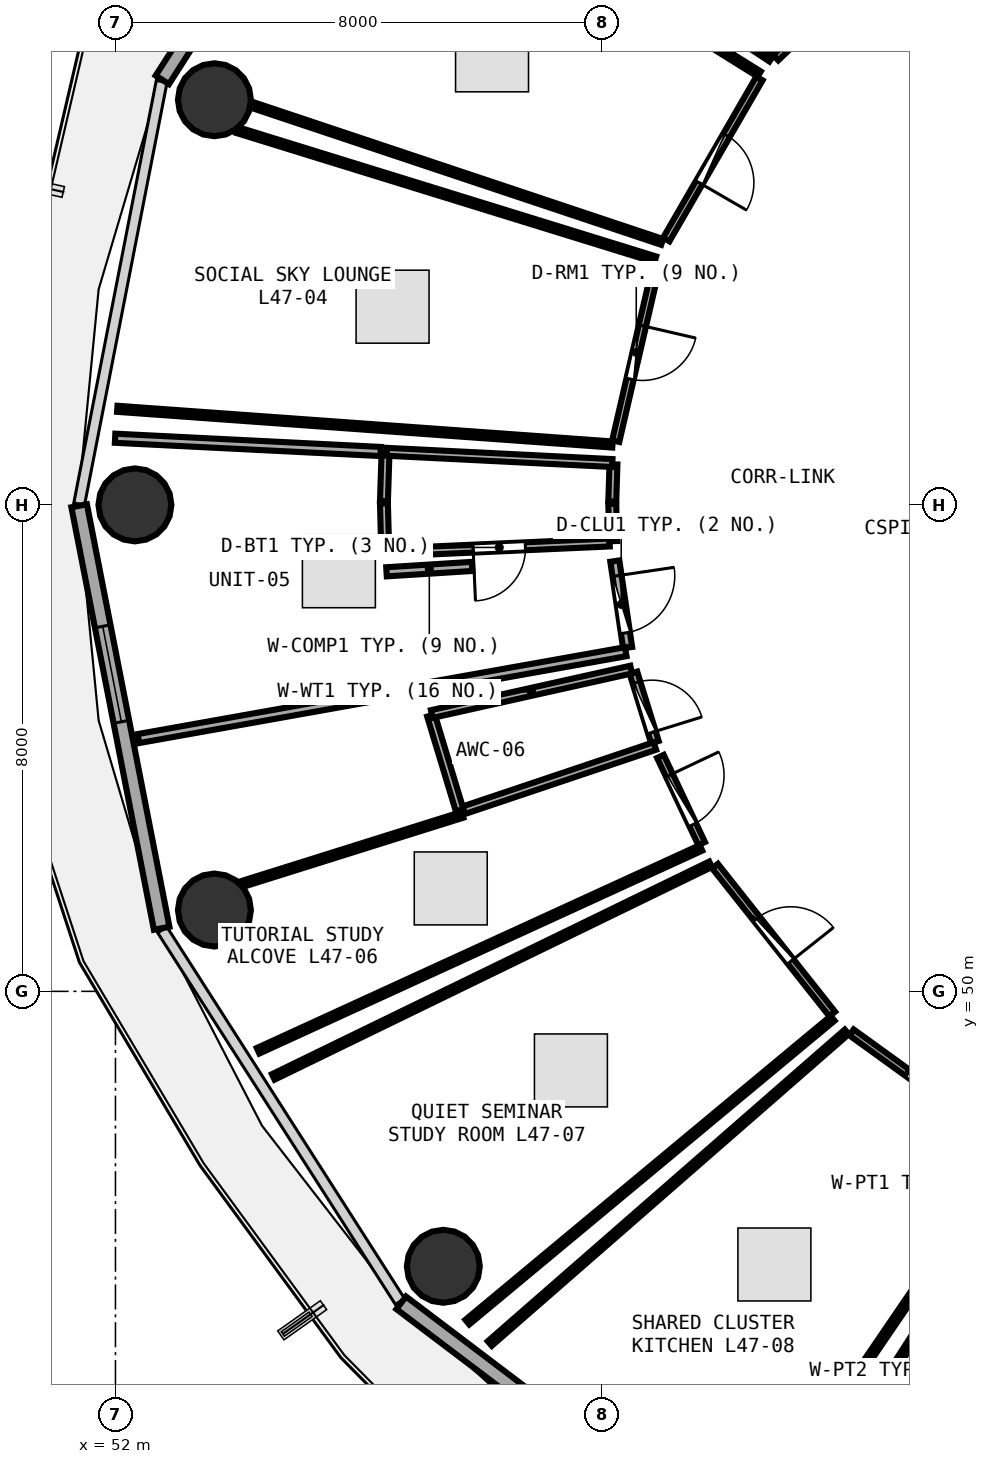
"""IFC4 building model, lengths in metres.
Left out: names, types, materials, properties, quantities, classifications, styles, units other than length and angle.
Written with IfcOpenShell. Run it as: python <this file> out.ifc"""

import sys

from ifc_helpers import new_model, si_unit, direction, frame, frame_2d, origin, origin_2d, place, context, subcontext, project, spatial, rectangle, circle, extrude, element, fill, save


model = new_model("IFC4")
c1 = context("Model", 3, precision=1e-05, world=origin(), true_north=direction((0.0, 1.0)))
c2 = subcontext(c1, "Body", "Model", "MODEL_VIEW")
j1 = project(units=[si_unit("LENGTHUNIT", "METRE"), si_unit("PLANEANGLEUNIT", "RADIAN")], contexts=[c1])
p1 = place(None, origin())
s1 = spatial("IfcSite", under=j1, at=p1, CompositionType="ELEMENT")
p2 = place(p1, origin())
s2 = spatial("IfcBuilding", under=s1, at=p2, CompositionType="ELEMENT")
p3 = place(p2, frame((0.0, 0.0, 184.35)))
s3 = spatial("IfcBuildingStorey", under=s2, at=p3, CompositionType="ELEMENT", Elevation=184.35)
for number, where, z_axis, x_axis in (
    (1, (53.627, 64.663, 0.0), (0.0, 0.0, 1.0), (1.0, 0.0, 0.0)),
    (2, (52.32, 58.0, 0.0), (0.0, 0.0, 1.0), (1.0, 0.0, 0.0)),
    (3, (53.627, 51.337, 0.0), (0.0, 0.0, 1.0), (1.0, 0.0, 0.0)),
    (4, (57.392, 45.479, 0.0), (0.0, 0.0, 1.0), (1.0, 0.0, 0.0)),
):
    element("IfcColumn", number, at=place(p3, frame(where, z_axis=z_axis, x_axis=x_axis)), inside=s3, PredefinedType="COLUMN", context=c2, shape_type="SweptSolid", body=[
        extrude(circle(Radius=0.6, at=origin_2d()), origin(), (0.0, 0.0, 1.0), 4.76),
    ])
p4 = place(p3, frame((56.679, 71.1, 0.0), z_axis=(0.0, 0.0, 1.0), x_axis=(-0.538801521808, -0.842432739213, 0.0)))
e5 = element("IfcWall", 5, at=p4, inside=s3, PredefinedType="SOLIDWALL", context=c2, shape_type="SweptSolid", body=[
    extrude(rectangle(XDim=7.253, YDim=0.26, at=frame_2d((3.627, 0.0))), origin(), (0.0, 0.0, 1.0), 4.345),
])
p5 = place(p4, frame((3.152, 0.0, 0.0)))
e6 = element("IfcOpeningElement", 6, at=p5, cuts=e5, PredefinedType="OPENING", context=c2, shape_type="SweptSolid", body=[
    extrude(rectangle(XDim=0.95, YDim=2.1, at=frame_2d((0.475, 1.05))), frame((0.0, 0.14, 0.0), z_axis=(0.0, -1.0, 0.0), x_axis=(1.0, 0.0, 0.0)), (0.0, 0.0, 1.0), 0.28),
])
p6 = place(p4, frame((4.452, 0.0, 0.85)))
e7 = element("IfcOpeningElement", 7, at=p6, cuts=e5, PredefinedType="OPENING", context=c2, shape_type="SweptSolid", body=[
    extrude(rectangle(XDim=1.2, YDim=1.45, at=frame_2d((0.6, 0.725))), frame((0.0, 0.14, 0.0), z_axis=(0.0, -1.0, 0.0), x_axis=(1.0, 0.0, 0.0)), (0.0, 0.0, 1.0), 0.28),
])
p7 = place(p3, frame((51.403, 57.985, 0.0), z_axis=(0.0, 0.0, 1.0), x_axis=(0.191716984769, -0.981450252306, 0.0)))
e8 = element("IfcWall", 8, at=p7, inside=s3, PredefinedType="SOLIDWALL", context=c2, shape_type="SweptSolid", body=[
    extrude(rectangle(XDim=7.079, YDim=0.26, at=frame_2d((3.54, 0.0))), origin(), (0.0, 0.0, 1.0), 4.345),
])
p8 = place(p7, frame((2.02, 0.0, 0.85)))
e9 = element("IfcOpeningElement", 9, at=p8, cuts=e8, PredefinedType="OPENING", context=c2, shape_type="SweptSolid", body=[
    extrude(rectangle(XDim=1.6, YDim=1.45, at=frame_2d((0.8, 0.725))), frame((0.0, 0.14, 0.0), z_axis=(0.0, -1.0, 0.0), x_axis=(1.0, 0.0, 0.0)), (0.0, 0.0, 1.0), 0.28),
])
p9 = place(p3, frame((56.699, 44.878, 0.0), z_axis=(0.0, 0.0, 1.0), x_axis=(0.797163719609, -0.603763202042, 0.0)))
e10 = element("IfcWall", 10, at=p9, inside=s3, PredefinedType="SOLIDWALL", context=c2, shape_type="SweptSolid", body=[
    extrude(rectangle(XDim=7.512, YDim=0.26, at=frame_2d((3.756, 0.0))), origin(), (0.0, 0.0, 1.0), 4.345),
])
p10 = place(p9, frame((2.956, 0.0, 0.85)))
e11 = element("IfcOpeningElement", 11, at=p10, cuts=e10, PredefinedType="OPENING", context=c2, shape_type="SweptSolid", body=[
    extrude(rectangle(XDim=1.6, YDim=1.45, at=frame_2d((0.8, 0.725))), frame((0.0, 0.14, 0.0), z_axis=(0.0, -1.0, 0.0), x_axis=(1.0, 0.0, 0.0)), (0.0, 0.0, 1.0), 0.28),
])
p11 = place(p3, frame((65.135, 67.531, 0.0), z_axis=(0.0, 0.0, 1.0), x_axis=(-0.722401093559, -0.691474265627, 0.0)))
e12 = element("IfcWall", 12, at=p11, inside=s3, PredefinedType="PARTITIONING", context=c2, shape_type="SweptSolid", body=[
    extrude(rectangle(XDim=3.15, YDim=0.12, at=frame_2d((1.575, 0.0))), origin(), (0.0, 0.0, 1.0), 2.345),
])
p12 = place(p11, frame((1.125, 0.0, 0.0)))
e13 = element("IfcOpeningElement", 13, at=p12, cuts=e12, PredefinedType="OPENING", context=c2, shape_type="SweptSolid", body=[
    extrude(rectangle(XDim=0.9, YDim=2.08, at=frame_2d((0.45, 1.04))), frame((0.0, 0.07, 0.0), z_axis=(0.0, -1.0, 0.0), x_axis=(1.0, 0.0, 0.0)), (0.0, 0.0, 1.0), 0.14),
])
p13 = place(p3, frame((62.591, 65.012, 0.0), z_axis=(0.0, 0.0, 1.0), x_axis=(-0.500746842293, -0.865593784598, 0.0)))
e14 = element("IfcWall", 14, at=p13, inside=s3, PredefinedType="PARTITIONING", context=c2, shape_type="SweptSolid", body=[
    extrude(rectangle(XDim=3.059, YDim=0.12, at=frame_2d((1.53, 0.0))), origin(), (0.0, 0.0, 1.0), 2.345),
])
p14 = place(p13, frame((1.08, 0.0, 0.0)))
e15 = element("IfcOpeningElement", 15, at=p14, cuts=e14, PredefinedType="OPENING", context=c2, shape_type="SweptSolid", body=[
    extrude(rectangle(XDim=0.9, YDim=2.08, at=frame_2d((0.45, 1.04))), frame((0.0, 0.07, 0.0), z_axis=(0.0, -1.0, 0.0), x_axis=(1.0, 0.0, 0.0)), (0.0, 0.0, 1.0), 0.14),
])
p15 = place(p3, frame((60.903, 61.968, 0.0), z_axis=(0.0, 0.0, 1.0), x_axis=(-0.225317744346, -0.974285335045, 0.0)))
e16 = element("IfcWall", 16, at=p15, inside=s3, PredefinedType="PARTITIONING", context=c2, shape_type="SweptSolid", body=[
    extrude(rectangle(XDim=2.996, YDim=0.12, at=frame_2d((1.498, 0.0))), origin(), (0.0, 0.0, 1.0), 4.35),
])
p16 = place(p15, frame((1.048, 0.0, 0.0)))
e17 = element("IfcOpeningElement", 17, at=p16, cuts=e16, PredefinedType="OPENING", context=c2, shape_type="SweptSolid", body=[
    extrude(rectangle(XDim=0.9, YDim=2.08, at=frame_2d((0.45, 1.04))), frame((0.0, 0.07, 0.0), z_axis=(0.0, -1.0, 0.0), x_axis=(1.0, 0.0, 0.0)), (0.0, 0.0, 1.0), 0.14),
])
p17 = place(p3, frame((60.127, 57.381, 0.0), z_axis=(0.0, 0.0, 1.0), x_axis=(-0.998998516644, -0.044743309488, 0.0)))
e18 = element("IfcWall", 18, at=p17, inside=s3, PredefinedType="PLUMBINGWALL", context=c2, shape_type="SweptSolid", body=[
    extrude(rectangle(XDim=3.634, YDim=0.13, at=frame_2d((1.817, 0.0))), origin(), (0.0, 0.0, 1.0), 4.045),
])
p18 = place(p17, frame((1.387, 0.0, 0.0)))
e19 = element("IfcOpeningElement", 19, at=p18, cuts=e18, PredefinedType="OPENING", context=c2, shape_type="SweptSolid", body=[
    extrude(rectangle(XDim=0.86, YDim=2.05, at=frame_2d((0.43, 1.025))), frame((0.0, 0.075, 0.0), z_axis=(0.0, -1.0, 0.0), x_axis=(1.0, 0.0, 0.0)), (0.0, 0.0, 1.0), 0.15),
])
p19 = place(p3, frame((60.213, 57.076, 0.0), z_axis=(0.0, 0.0, 1.0), x_axis=(0.146099718117, -0.98926986832, 0.0)))
e20 = element("IfcWall", 20, at=p19, inside=s3, PredefinedType="PARTITIONING", context=c2, shape_type="SweptSolid", body=[
    extrude(rectangle(XDim=1.439, YDim=0.15, at=frame_2d((0.719, 0.0))), origin(), (0.0, 0.0, 1.0), 4.35),
])
p20 = place(p19, frame((0.244, 0.0, 0.0)))
e21 = element("IfcOpeningElement", 21, at=p20, cuts=e20, PredefinedType="OPENING", context=c2, shape_type="SweptSolid", body=[
    extrude(rectangle(XDim=0.95, YDim=2.08, at=frame_2d((0.475, 1.04))), frame((0.0, 0.085, 0.0), z_axis=(0.0, -1.0, 0.0), x_axis=(1.0, 0.0, 0.0)), (0.0, 0.0, 1.0), 0.17),
])
p21 = place(p3, frame((60.519, 55.239, 0.0), z_axis=(0.0, 0.0, 1.0), x_axis=(0.296096905528, -0.955157904504, 0.0)))
e22 = element("IfcWall", 22, at=p21, inside=s3, PredefinedType="PLUMBINGWALL", context=c2, shape_type="SweptSolid", body=[
    extrude(rectangle(XDim=1.194, YDim=0.13, at=frame_2d((0.597, 0.0))), origin(), (0.0, 0.0, 1.0), 4.35),
])
p22 = place(p21, frame((0.167, 0.0, 0.0)))
e23 = element("IfcOpeningElement", 23, at=p22, cuts=e22, PredefinedType="OPENING", context=c2, shape_type="SweptSolid", body=[
    extrude(rectangle(XDim=0.86, YDim=2.05, at=frame_2d((0.43, 1.025))), frame((0.0, 0.075, 0.0), z_axis=(0.0, -1.0, 0.0), x_axis=(1.0, 0.0, 0.0)), (0.0, 0.0, 1.0), 0.15),
])
p23 = place(p3, frame((60.963, 53.864, 0.0), z_axis=(0.0, 0.0, 1.0), x_axis=(0.427397920828, -0.904063613509, 0.0)))
e24 = element("IfcWall", 24, at=p23, inside=s3, PredefinedType="PARTITIONING", context=c2, shape_type="SweptSolid", body=[
    extrude(rectangle(XDim=1.586, YDim=0.12, at=frame_2d((0.793, 0.0))), origin(), (0.0, 0.0, 1.0), 4.105),
])
p24 = place(p23, frame((0.343, 0.0, 0.0)))
e25 = element("IfcOpeningElement", 25, at=p24, cuts=e24, PredefinedType="OPENING", context=c2, shape_type="SweptSolid", body=[
    extrude(rectangle(XDim=0.9, YDim=2.08, at=frame_2d((0.45, 1.04))), frame((0.0, 0.07, 0.0), z_axis=(0.0, -1.0, 0.0), x_axis=(1.0, 0.0, 0.0)), (0.0, 0.0, 1.0), 0.14),
])
p25 = place(p3, frame((61.86, 52.06, 0.0), z_axis=(0.0, 0.0, 1.0), x_axis=(0.621061577605, -0.783761773005, 0.0)))
e26 = element("IfcWall", 26, at=p25, inside=s3, PredefinedType="PARTITIONING", context=c2, shape_type="SweptSolid", body=[
    extrude(rectangle(XDim=3.103, YDim=0.12, at=frame_2d((1.552, 0.0))), origin(), (0.0, 0.0, 1.0), 2.345),
])
p26 = place(p25, frame((1.102, 0.0, 0.0)))
e27 = element("IfcOpeningElement", 27, at=p26, cuts=e26, PredefinedType="OPENING", context=c2, shape_type="SweptSolid", body=[
    extrude(rectangle(XDim=0.9, YDim=2.08, at=frame_2d((0.45, 1.04))), frame((0.0, 0.07, 0.0), z_axis=(0.0, -1.0, 0.0), x_axis=(1.0, 0.0, 0.0)), (0.0, 0.0, 1.0), 0.14),
])
p27 = place(p3, frame((64.106, 49.325, 0.0), z_axis=(0.0, 0.0, 1.0), x_axis=(0.810538273734, -0.585685672364, 0.0)))
e28 = element("IfcWall", 28, at=p27, inside=s3, PredefinedType="PARTITIONING", context=c2, shape_type="SweptSolid", body=[
    extrude(rectangle(XDim=3.198, YDim=0.12, at=frame_2d((1.599, 0.0))), origin(), (0.0, 0.0, 1.0), 2.345),
])
p28 = place(p27, frame((1.149, 0.0, 0.0)))
e29 = element("IfcOpeningElement", 29, at=p28, cuts=e28, PredefinedType="OPENING", context=c2, shape_type="SweptSolid", body=[
    extrude(rectangle(XDim=0.9, YDim=2.08, at=frame_2d((0.45, 1.04))), frame((0.0, 0.07, 0.0), z_axis=(0.0, -1.0, 0.0), x_axis=(1.0, 0.0, 0.0)), (0.0, 0.0, 1.0), 0.14),
])
p29 = place(p3, frame((62.783, 65.334, 0.0), z_axis=(0.0, 0.0, 1.0), x_axis=(-0.835790537916, 0.549048428401, 0.0)))
e30 = element("IfcWall", 30, at=p29, inside=s3, PredefinedType="PARTITIONING", context=c2, shape_type="SweptSolid", body=[
    extrude(rectangle(XDim=7.903, YDim=0.1, at=frame_2d((3.952, 0.0))), origin(), (0.0, 0.0, 1.0), 3.895),
])
p30 = place(p3, frame((60.991, 62.325, 0.0), z_axis=(0.0, 0.0, 1.0), x_axis=(-0.948483978449, 0.316825097847, 0.0)))
e31 = element("IfcWall", 31, at=p30, inside=s3, PredefinedType="PARTITIONING", context=c2, shape_type="SweptSolid", body=[
    extrude(rectangle(XDim=7.111, YDim=0.1, at=frame_2d((3.555, 0.0))), origin(), (0.0, 0.0, 1.0), 2.345),
])
p31 = place(p3, frame((55.866, 69.277, 0.0), z_axis=(0.0, 0.0, 1.0), x_axis=(0.84851390129, -0.529173090129, 0.0)))
e32 = element("IfcWall", 32, at=p31, inside=s3, PredefinedType="PARTITIONING", context=c2, shape_type="SweptSolid", body=[
    extrude(rectangle(XDim=7.921, YDim=0.1, at=frame_2d((3.96, 0.0))), origin(), (0.0, 0.0, 1.0), 2.345),
])
p32 = place(p3, frame((60.174, 58.993, 0.0), z_axis=(0.0, 0.0, 1.0), x_axis=(-0.997411279475, 0.071907854766, 0.0)))
e33 = element("IfcWall", 33, at=p32, inside=s3, PredefinedType="PARTITIONING", context=c2, shape_type="SweptSolid", body=[
    extrude(rectangle(XDim=8.166, YDim=0.1, at=frame_2d((4.083, 0.0))), origin(), (0.0, 0.0, 1.0), 3.895),
])
p33 = place(p3, frame((54.003, 64.163, 0.0), z_axis=(0.0, 0.0, 1.0), x_axis=(0.955390108929, -0.295346812679, 0.0)))
e34 = element("IfcWall", 34, at=p33, inside=s3, PredefinedType="PARTITIONING", context=c2, shape_type="SweptSolid", body=[
    extrude(rectangle(XDim=7.196, YDim=0.1, at=frame_2d((3.598, 0.0))), origin(), (0.0, 0.0, 1.0), 2.345),
])
p34 = place(p3, frame((60.19, 58.667, 0.0), z_axis=(0.0, 0.0, 1.0), x_axis=(-0.032292682442, -0.999478455326, 0.0)))
e35 = element("IfcWall", 35, at=p34, inside=s3, PredefinedType="PLUMBINGWALL", context=c2, shape_type="SweptSolid", body=[
    extrude(rectangle(XDim=0.612, YDim=0.13, at=frame_2d((0.306, 0.0))), origin(), (0.0, 0.0, 1.0), 2.345),
])
p35 = place(p3, frame((60.17, 58.015, 0.0), z_axis=(0.0, 0.0, 1.0), x_axis=(0.026369723842, -0.99965225837, 0.0)))
e36 = element("IfcWall", 36, at=p35, inside=s3, PredefinedType="PLUMBINGWALL", context=c2, shape_type="SweptSolid", body=[
    extrude(rectangle(XDim=0.611, YDim=0.13, at=frame_2d((0.306, 0.0))), origin(), (0.0, 0.0, 1.0), 2.345),
])
p36 = place(p3, frame((56.437, 57.236, 0.0), z_axis=(0.0, 0.0, 1.0), x_axis=(-0.026607722643, 0.999645951873, 0.0)))
e37 = element("IfcWall", 37, at=p36, inside=s3, PredefinedType="PLUMBINGWALL", context=c2, shape_type="SweptSolid", body=[
    extrude(rectangle(XDim=0.789, YDim=0.13, at=frame_2d((0.395, 0.0))), origin(), (0.0, 0.0, 1.0), 2.345),
])
p37 = place(p3, frame((56.416, 58.065, 0.0), z_axis=(0.0, 0.0, 1.0), x_axis=(0.03247049286, 0.999472694521, 0.0)))
e38 = element("IfcWall", 38, at=p37, inside=s3, PredefinedType="PLUMBINGWALL", context=c2, shape_type="SweptSolid", body=[
    extrude(rectangle(XDim=0.79, YDim=0.13, at=frame_2d((0.395, 0.0))), origin(), (0.0, 0.0, 1.0), 2.345),
])
p38 = place(p3, frame((56.462, 58.873, 0.0), z_axis=(0.0, 0.0, 1.0), x_axis=(0.998757579638, -0.049832691243, 0.0)))
e39 = element("IfcWall", 39, at=p38, inside=s3, PredefinedType="PLUMBINGWALL", context=c2, shape_type="SweptSolid", body=[
    extrude(rectangle(XDim=3.714, YDim=0.13, at=frame_2d((1.857, 0.0))), origin(), (0.0, 0.0, 1.0), 4.045),
])
p39 = place(p3, frame((60.393, 55.586, 0.0), z_axis=(0.0, 0.0, 1.0), x_axis=(-0.984476835755, -0.175514557407, 0.0)))
e40 = element("IfcWall", 40, at=p39, inside=s3, PredefinedType="PARTITIONING", context=c2, shape_type="SweptSolid", body=[
    extrude(rectangle(XDim=8.142, YDim=0.15, at=frame_2d((4.071, 0.0))), origin(), (0.0, 0.0, 1.0), 3.895),
])
p40 = place(p3, frame((51.994, 59.096, 0.0), z_axis=(0.0, 0.0, 1.0), x_axis=(0.998756789481, -0.049848525207, 0.0)))
e41 = element("IfcWall", 41, at=p40, inside=s3, PredefinedType="PARTITIONING", context=c2, shape_type="SweptSolid", body=[
    extrude(rectangle(XDim=4.374, YDim=0.15, at=frame_2d((2.187, 0.0))), origin(), (0.0, 0.0, 1.0), 3.895),
])
p41 = place(p3, frame((56.458, 56.899, 0.0), z_axis=(0.0, 0.0, 1.0), x_axis=(0.998023505666, 0.062841722907, 0.0)))
e42 = element("IfcWall", 42, at=p41, inside=s3, PredefinedType="PARTITIONING", context=c2, shape_type="SweptSolid", body=[
    extrude(rectangle(XDim=1.41, YDim=0.15, at=frame_2d((0.705, 0.0))), origin(), (0.0, 0.0, 1.0), 4.35),
])
p42 = place(p3, frame((60.871, 54.035, 0.0), z_axis=(0.0, 0.0, 1.0), x_axis=(-0.947910298115, -0.318537386704, 0.0)))
e43 = element("IfcWall", 43, at=p42, inside=s3, PredefinedType="PLUMBINGWALL", context=c2, shape_type="SweptSolid", body=[
    extrude(rectangle(XDim=3.36, YDim=0.13, at=frame_2d((1.68, 0.0))), origin(), (0.0, 0.0, 1.0), 4.045),
])
p43 = place(p3, frame((57.661, 52.977, 0.0), z_axis=(0.0, 0.0, 1.0), x_axis=(-0.289861876094, 0.957068489079, 0.0)))
e44 = element("IfcWall", 44, at=p43, inside=s3, PredefinedType="PLUMBINGWALL", context=c2, shape_type="SweptSolid", body=[
    extrude(rectangle(XDim=1.63, YDim=0.13, at=frame_2d((0.815, 0.0))), origin(), (0.0, 0.0, 1.0), 4.35),
])
p44 = place(p3, frame((57.202, 54.56, 0.0), z_axis=(0.0, 0.0, 1.0), x_axis=(0.976027779337, 0.217645983107, 0.0)))
e45 = element("IfcWall", 45, at=p44, inside=s3, PredefinedType="PLUMBINGWALL", context=c2, shape_type="SweptSolid", body=[
    extrude(rectangle(XDim=3.36, YDim=0.13, at=frame_2d((1.68, 0.0))), origin(), (0.0, 0.0, 1.0), 4.045),
])
p45 = place(p3, frame((61.63, 52.359, 0.0), z_axis=(0.0, 0.0, 1.0), x_axis=(-0.909155211227, -0.416457443083, 0.0)))
e46 = element("IfcWall", 46, at=p45, inside=s3, PredefinedType="PARTITIONING", context=c2, shape_type="SweptSolid", body=[
    extrude(rectangle(XDim=8.012, YDim=0.1, at=frame_2d((4.006, 0.0))), origin(), (0.0, 0.0, 1.0), 2.345),
])
p46 = place(p3, frame((54.083, 51.765, 0.0), z_axis=(0.0, 0.0, 1.0), x_axis=(0.954047805858, 0.299654441212, 0.0)))
e47 = element("IfcWall", 47, at=p46, inside=s3, PredefinedType="PARTITIONING", context=c2, shape_type="SweptSolid", body=[
    extrude(rectangle(XDim=3.798, YDim=0.1, at=frame_2d((1.899, 0.0))), origin(), (0.0, 0.0, 1.0), 2.345),
])
p47 = place(p3, frame((63.794, 49.555, 0.0), z_axis=(0.0, 0.0, 1.0), x_axis=(-0.768927769446, -0.639335659396, 0.0)))
e48 = element("IfcWall", 48, at=p47, inside=s3, PredefinedType="PARTITIONING", context=c2, shape_type="SweptSolid", body=[
    extrude(rectangle(XDim=7.812, YDim=0.1, at=frame_2d((3.906, 0.0))), origin(), (0.0, 0.0, 1.0), 2.345),
])
p48 = place(p3, frame((54.595, 48.593, 0.0), z_axis=(0.0, 0.0, 1.0), x_axis=(0.899324003441, 0.437282902518, 0.0)))
e49 = element("IfcWall", 49, at=p48, inside=s3, PredefinedType="PARTITIONING", context=c2, shape_type="SweptSolid", body=[
    extrude(rectangle(XDim=7.997, YDim=0.1, at=frame_2d((3.999, 0.0))), origin(), (0.0, 0.0, 1.0), 2.345),
])
p49 = place(p3, frame((66.723, 47.384, 0.0), z_axis=(0.0, 0.0, 1.0), x_axis=(-0.563521193737, -0.826101606468, 0.0)))
e50 = element("IfcWall", 50, at=p49, inside=s3, PredefinedType="PARTITIONING", context=c2, shape_type="SweptSolid", body=[
    extrude(rectangle(XDim=6.944, YDim=0.1, at=frame_2d((3.472, 0.0))), origin(), (0.0, 0.0, 1.0), 2.345),
])
p50 = place(p3, frame((58.156, 44.208, 0.0), z_axis=(0.0, 0.0, 1.0), x_axis=(0.753307828271, 0.657668089438, 0.0)))
e51 = element("IfcWall", 51, at=p50, inside=s3, PredefinedType="PARTITIONING", context=c2, shape_type="SweptSolid", body=[
    extrude(rectangle(XDim=7.793, YDim=0.1, at=frame_2d((3.897, 0.0))), origin(), (0.0, 0.0, 1.0), 2.345),
])
p51 = place(p3, frame((63.44, 41.689, 0.0), z_axis=(0.0, 0.0, 1.0), x_axis=(0.542254246964, 0.840214455749, 0.0)))
e52 = element("IfcWall", 52, at=p51, inside=s3, PredefinedType="PARTITIONING", context=c2, shape_type="SweptSolid", body=[
    extrude(rectangle(XDim=6.592, YDim=0.1, at=frame_2d((3.296, 0.0))), origin(), (0.0, 0.0, 1.0), 2.345),
])
p52 = place(p8, origin())
e53 = element("IfcWindow", 53, at=p52, inside=s3, PartitioningType="SINGLE_PANEL", PredefinedType="WINDOW", context=c2, shape_type="SweptSolid", body=[
    extrude(rectangle(XDim=1.6, YDim=1.45, at=frame_2d((0.8, 0.725))), frame((0.0, 0.03, 0.0), z_axis=(0.0, -1.0, 0.0), x_axis=(1.0, 0.0, 0.0)), (0.0, 0.0, 1.0), 0.06),
])
fill(e9, e53)
p53 = place(p14, origin())
e54 = element("IfcDoor", 54, at=p53, inside=s3, OperationType="SINGLE_SWING_RIGHT", PredefinedType="DOOR", context=c2, shape_type="SweptSolid", body=[
    extrude(rectangle(XDim=0.9, YDim=2.08, at=frame_2d((0.45, 1.04))), frame((0.0, 0.025, 0.0), z_axis=(0.0, -1.0, 0.0), x_axis=(1.0, 0.0, 0.0)), (0.0, 0.0, 1.0), 0.05),
])
fill(e15, e54)
p54 = place(p16, origin())
e55 = element("IfcDoor", 55, at=p54, inside=s3, OperationType="SINGLE_SWING_LEFT", PredefinedType="DOOR", context=c2, shape_type="SweptSolid", body=[
    extrude(rectangle(XDim=0.9, YDim=2.08, at=frame_2d((0.45, 1.04))), frame((0.0, 0.025, 0.0), z_axis=(0.0, -1.0, 0.0), x_axis=(1.0, 0.0, 0.0)), (0.0, 0.0, 1.0), 0.05),
])
fill(e17, e55)
p55 = place(p18, origin())
e56 = element("IfcDoor", 56, at=p55, inside=s3, OperationType="SINGLE_SWING_RIGHT", PredefinedType="DOOR", context=c2, shape_type="SweptSolid", body=[
    extrude(rectangle(XDim=0.86, YDim=2.05, at=frame_2d((0.43, 1.025))), frame((0.0, 0.025, 0.0), z_axis=(0.0, -1.0, 0.0), x_axis=(1.0, 0.0, 0.0)), (0.0, 0.0, 1.0), 0.05),
])
fill(e19, e56)
p56 = place(p20, origin())
e57 = element("IfcDoor", 57, at=p56, inside=s3, OperationType="SINGLE_SWING_LEFT", PredefinedType="DOOR", context=c2, shape_type="SweptSolid", body=[
    extrude(rectangle(XDim=0.95, YDim=2.08, at=frame_2d((0.475, 1.04))), frame((0.0, 0.025, 0.0), z_axis=(0.0, -1.0, 0.0), x_axis=(1.0, 0.0, 0.0)), (0.0, 0.0, 1.0), 0.05),
])
fill(e21, e57)
p57 = place(p22, origin())
e58 = element("IfcDoor", 58, at=p57, inside=s3, OperationType="SINGLE_SWING_RIGHT", PredefinedType="DOOR", context=c2, shape_type="SweptSolid", body=[
    extrude(rectangle(XDim=0.86, YDim=2.05, at=frame_2d((0.43, 1.025))), frame((0.0, 0.025, 0.0), z_axis=(0.0, -1.0, 0.0), x_axis=(1.0, 0.0, 0.0)), (0.0, 0.0, 1.0), 0.05),
])
fill(e23, e58)
p58 = place(p24, origin())
e59 = element("IfcDoor", 59, at=p58, inside=s3, OperationType="SINGLE_SWING_LEFT", PredefinedType="DOOR", context=c2, shape_type="SweptSolid", body=[
    extrude(rectangle(XDim=0.9, YDim=2.08, at=frame_2d((0.45, 1.04))), frame((0.0, 0.025, 0.0), z_axis=(0.0, -1.0, 0.0), x_axis=(1.0, 0.0, 0.0)), (0.0, 0.0, 1.0), 0.05),
])
fill(e25, e59)
p59 = place(p26, origin())
e60 = element("IfcDoor", 60, at=p59, inside=s3, OperationType="SINGLE_SWING_RIGHT", PredefinedType="DOOR", context=c2, shape_type="SweptSolid", body=[
    extrude(rectangle(XDim=0.9, YDim=2.08, at=frame_2d((0.45, 1.04))), frame((0.0, 0.025, 0.0), z_axis=(0.0, -1.0, 0.0), x_axis=(1.0, 0.0, 0.0)), (0.0, 0.0, 1.0), 0.05),
])
fill(e27, e60)
p60 = place(p28, origin())
e61 = element("IfcDoor", 61, at=p60, inside=s3, OperationType="SINGLE_SWING_LEFT", PredefinedType="DOOR", context=c2, shape_type="SweptSolid", body=[
    extrude(rectangle(XDim=0.9, YDim=2.08, at=frame_2d((0.45, 1.04))), frame((0.0, 0.025, 0.0), z_axis=(0.0, -1.0, 0.0), x_axis=(1.0, 0.0, 0.0)), (0.0, 0.0, 1.0), 0.05),
])
fill(e29, e61)
save(model, sys.argv[1])
